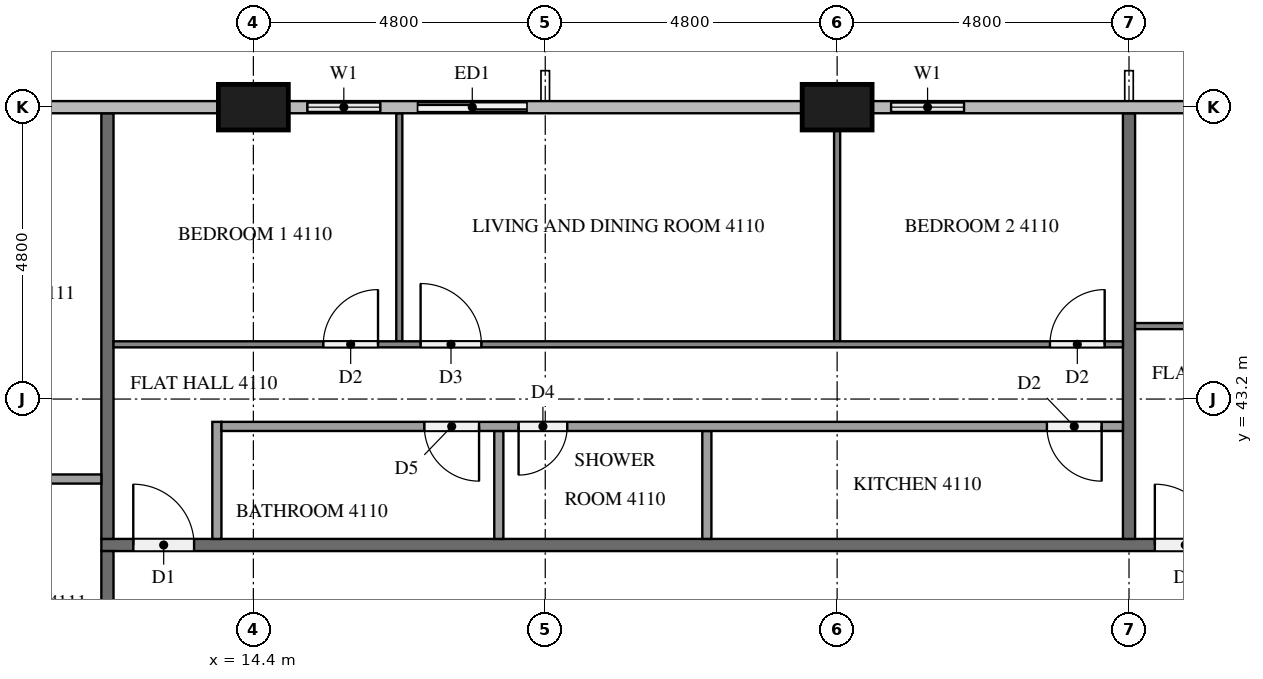
"""IFC4 building model, lengths in metres.
Left out: names, types, materials, properties, quantities, classifications, styles, units other than length and angle.
Written with IfcOpenShell. Run it as: python <this file> out.ifc"""

import sys

from ifc_helpers import new_model, si_unit, direction, frame, frame_2d, origin, origin_2d, place, context, subcontext, project, spatial, rectangle, extrude, element, fill, save


model = new_model("IFC4")
c1 = context("Model", 3, precision=1e-05, world=origin(), true_north=direction((0.0, 1.0)))
c2 = subcontext(c1, "Body", "Model", "MODEL_VIEW")
j1 = project(units=[si_unit("LENGTHUNIT", "METRE"), si_unit("PLANEANGLEUNIT", "RADIAN")], contexts=[c1])
p1 = place(None, origin())
s1 = spatial("IfcSite", under=j1, at=p1, CompositionType="ELEMENT")
p2 = place(p1, origin())
s2 = spatial("IfcBuilding", under=s1, at=p2, CompositionType="ELEMENT")
p3 = place(p2, frame((0.0, 0.0, 159.5)))
s3 = spatial("IfcBuildingStorey", under=s2, at=p3, CompositionType="ELEMENT", Elevation=159.5)
for number, where, z_axis, x_axis in (
    (1, (24.0, 48.0, 0.0), (0.0, 0.0, 1.0), (1.0, 0.0, 0.0)),
    (2, (14.4, 48.0, 0.0), (0.0, 0.0, 1.0), (1.0, 0.0, 0.0)),
):
    element("IfcColumn", number, at=place(p3, frame(where, z_axis=z_axis, x_axis=x_axis)), inside=s3, PredefinedType="COLUMN", context=c2, shape_type="SweptSolid", body=[
        extrude(rectangle(XDim=1.15, YDim=0.75, at=origin_2d()), origin(), (0.0, 0.0, 1.0), 3.2),
    ])
p4 = place(p3, frame((26.4, 48.0, 0.0), z_axis=(0.0, 0.0, 1.0), x_axis=(-1.0, 0.0, 0.0)))
e3 = element("IfcWall", 3, at=p4, inside=s3, PredefinedType="SOLIDWALL", context=c2, shape_type="SweptSolid", body=[
    extrude(rectangle(XDim=1.825, YDim=0.15, at=frame_2d((0.913, 0.0))), origin(), (0.0, 0.0, 1.0), 3.2),
])
p5 = place(p4, frame((0.312, 0.0, 0.9)))
e4 = element("IfcOpeningElement", 4, at=p5, cuts=e3, PredefinedType="OPENING", context=c2, shape_type="SweptSolid", body=[
    extrude(rectangle(XDim=1.2, YDim=1.4, at=frame_2d((0.6, 0.7))), frame((0.0, 0.085, 0.0), z_axis=(0.0, -1.0, 0.0), x_axis=(1.0, 0.0, 0.0)), (0.0, 0.0, 1.0), 0.17),
])
p6 = place(p3, frame((19.2, 48.0, 0.0), z_axis=(0.0, 0.0, 1.0), x_axis=(-1.0, 0.0, 0.0)))
e5 = element("IfcWall", 5, at=p6, inside=s3, PredefinedType="SOLIDWALL", context=c2, shape_type="SweptSolid", body=[
    extrude(rectangle(XDim=4.225, YDim=0.15, at=frame_2d((2.112, 0.0))), origin(), (0.0, 0.0, 1.0), 3.2),
])
p7 = place(p6, frame((0.3, 0.0, 0.0)))
e6 = element("IfcOpeningElement", 6, at=p7, cuts=e5, PredefinedType="OPENING", context=c2, shape_type="SweptSolid", body=[
    extrude(rectangle(XDim=1.8, YDim=2.4, at=frame_2d((0.9, 1.2))), frame((0.0, 0.085, 0.0), z_axis=(0.0, -1.0, 0.0), x_axis=(1.0, 0.0, 0.0)), (0.0, 0.0, 1.0), 0.17),
])
p8 = place(p6, frame((2.712, 0.0, 0.9)))
e7 = element("IfcOpeningElement", 7, at=p8, cuts=e5, PredefinedType="OPENING", context=c2, shape_type="SweptSolid", body=[
    extrude(rectangle(XDim=1.2, YDim=1.4, at=frame_2d((0.6, 0.7))), frame((0.0, 0.085, 0.0), z_axis=(0.0, -1.0, 0.0), x_axis=(1.0, 0.0, 0.0)), (0.0, 0.0, 1.0), 0.17),
])
p9 = place(p3, frame((11.9, 40.8, 0.0), z_axis=(0.0, 0.0, 1.0), x_axis=(1.0, 0.0, 0.0)))
e8 = element("IfcWall", 8, at=p9, inside=s3, PredefinedType="PARTITIONING", context=c2, shape_type="SweptSolid", body=[
    extrude(rectangle(XDim=38.6, YDim=0.2, at=frame_2d((19.3, 0.0))), origin(), (0.0, 0.0, 1.0), 3.2),
])
p10 = place(p9, frame((31.725, 0.0, 0.0)))
e9 = element("IfcOpeningElement", 9, at=p10, cuts=e8, PredefinedType="OPENING", context=c2, shape_type="SweptSolid", body=[
    extrude(rectangle(XDim=1.0, YDim=2.1, at=frame_2d((0.5, 1.05))), frame((0.0, 0.11, 0.0), z_axis=(0.0, -1.0, 0.0), x_axis=(1.0, 0.0, 0.0)), (0.0, 0.0, 1.0), 0.22),
])
p11 = place(p9, frame((17.325, 0.0, 0.0)))
e10 = element("IfcOpeningElement", 10, at=p11, cuts=e8, PredefinedType="OPENING", context=c2, shape_type="SweptSolid", body=[
    extrude(rectangle(XDim=1.0, YDim=2.1, at=frame_2d((0.5, 1.05))), frame((0.0, 0.11, 0.0), z_axis=(0.0, -1.0, 0.0), x_axis=(1.0, 0.0, 0.0)), (0.0, 0.0, 1.0), 0.22),
])
p12 = place(p9, frame((0.525, 0.0, 0.0)))
e11 = element("IfcOpeningElement", 11, at=p12, cuts=e8, PredefinedType="OPENING", context=c2, shape_type="SweptSolid", body=[
    extrude(rectangle(XDim=1.0, YDim=2.1, at=frame_2d((0.5, 1.05))), frame((0.0, 0.11, 0.0), z_axis=(0.0, -1.0, 0.0), x_axis=(1.0, 0.0, 0.0)), (0.0, 0.0, 1.0), 0.22),
])
p13 = place(p3, frame((12.0, 12.1, 0.0), z_axis=(0.0, 0.0, 1.0), x_axis=(0.0, 1.0, 0.0)))
e12 = element("IfcWall", 12, at=p13, inside=s3, PredefinedType="PARTITIONING", context=c2, shape_type="SweptSolid", body=[
    extrude(rectangle(XDim=28.6, YDim=0.2, at=frame_2d((14.3, 0.0))), origin(), (0.0, 0.0, 1.0), 3.2),
])
p14 = place(p13, frame((24.325, 0.0, 0.0)))
e13 = element("IfcOpeningElement", 13, at=p14, cuts=e12, PredefinedType="OPENING", context=c2, shape_type="SweptSolid", body=[
    extrude(rectangle(XDim=1.0, YDim=2.1, at=frame_2d((0.5, 1.05))), frame((0.0, 0.11, 0.0), z_axis=(0.0, -1.0, 0.0), x_axis=(1.0, 0.0, 0.0)), (0.0, 0.0, 1.0), 0.22),
])
p15 = place(p13, frame((22.475, 0.0, 0.0)))
e14 = element("IfcOpeningElement", 14, at=p15, cuts=e12, PredefinedType="OPENING", context=c2, shape_type="SweptSolid", body=[
    extrude(rectangle(XDim=1.0, YDim=2.1, at=frame_2d((0.5, 1.05))), frame((0.0, 0.11, 0.0), z_axis=(0.0, -1.0, 0.0), x_axis=(1.0, 0.0, 0.0)), (0.0, 0.0, 1.0), 0.22),
])
p16 = place(p13, frame((0.325, 0.0, 0.0)))
e15 = element("IfcOpeningElement", 15, at=p16, cuts=e12, PredefinedType="OPENING", context=c2, shape_type="SweptSolid", body=[
    extrude(rectangle(XDim=1.0, YDim=2.1, at=frame_2d((0.5, 1.05))), frame((0.0, 0.11, 0.0), z_axis=(0.0, -1.0, 0.0), x_axis=(1.0, 0.0, 0.0)), (0.0, 0.0, 1.0), 0.22),
])
for number, where, z_axis, x_axis in (
    (16, (28.8, 47.9, 0.0), (0.0, 0.0, 1.0), (0.0, -1.0, 0.0)),
    (17, (12.0, 47.9, 0.0), (0.0, 0.0, 1.0), (0.0, -1.0, 0.0)),
):
    element("IfcWall", number, at=place(p3, frame(where, z_axis=z_axis, x_axis=x_axis)), inside=s3, PredefinedType="PARTITIONING", context=c2, shape_type="SweptSolid", body=[
        extrude(rectangle(XDim=7.0, YDim=0.2, at=frame_2d((3.5, 0.0))), origin(), (0.0, 0.0, 1.0), 3.2),
    ])
p17 = place(p3, frame((28.9, 44.4, 0.0), z_axis=(0.0, 0.0, 1.0), x_axis=(1.0, 0.0, 0.0)))
e18 = element("IfcWall", 18, at=p17, inside=s3, PredefinedType="PARTITIONING", context=c2, shape_type="SweptSolid", body=[
    extrude(rectangle(XDim=14.2, YDim=0.1, at=frame_2d((7.1, 0.0))), origin(), (0.0, 0.0, 1.0), 3.2),
])
p18 = place(p17, frame((3.45, 0.0, 0.0)))
e19 = element("IfcOpeningElement", 19, at=p18, cuts=e18, PredefinedType="OPENING", context=c2, shape_type="SweptSolid", body=[
    extrude(rectangle(XDim=0.9, YDim=2.1, at=frame_2d((0.45, 1.05))), frame((0.0, 0.06, 0.0), z_axis=(0.0, -1.0, 0.0), x_axis=(1.0, 0.0, 0.0)), (0.0, 0.0, 1.0), 0.12),
])
p19 = place(p17, frame((5.05, 0.0, 0.0)))
e20 = element("IfcOpeningElement", 20, at=p19, cuts=e18, PredefinedType="OPENING", context=c2, shape_type="SweptSolid", body=[
    extrude(rectangle(XDim=0.9, YDim=2.1, at=frame_2d((0.45, 1.05))), frame((0.0, 0.06, 0.0), z_axis=(0.0, -1.0, 0.0), x_axis=(1.0, 0.0, 0.0)), (0.0, 0.0, 1.0), 0.12),
])
p20 = place(p17, frame((12.9, 0.0, 0.0)))
e21 = element("IfcOpeningElement", 21, at=p20, cuts=e18, PredefinedType="OPENING", context=c2, shape_type="SweptSolid", body=[
    extrude(rectangle(XDim=1.0, YDim=2.1, at=frame_2d((0.5, 1.05))), frame((0.0, 0.06, 0.0), z_axis=(0.0, -1.0, 0.0), x_axis=(1.0, 0.0, 0.0)), (0.0, 0.0, 1.0), 0.12),
])
p21 = place(p3, frame((16.8, 44.15, 0.0), z_axis=(0.0, 0.0, 1.0), x_axis=(0.0, 1.0, 0.0)))
e22 = element("IfcWall", 22, at=p21, inside=s3, PredefinedType="PARTITIONING", context=c2, shape_type="SweptSolid", body=[
    extrude(rectangle(XDim=3.75, YDim=0.1, at=frame_2d((1.875, 0.0))), origin(), (0.0, 0.0, 1.0), 3.2),
])
p22 = place(p3, frame((24.0, 44.15, 0.0), z_axis=(0.0, 0.0, 1.0), x_axis=(0.0, 1.0, 0.0)))
e23 = element("IfcWall", 23, at=p22, inside=s3, PredefinedType="PARTITIONING", context=c2, shape_type="SweptSolid", body=[
    extrude(rectangle(XDim=3.475, YDim=0.1, at=frame_2d((1.738, 0.0))), origin(), (0.0, 0.0, 1.0), 3.2),
])
p23 = place(p3, frame((12.1, 44.1, 0.0), z_axis=(0.0, 0.0, 1.0), x_axis=(1.0, 0.0, 0.0)))
e24 = element("IfcWall", 24, at=p23, inside=s3, PredefinedType="PARTITIONING", context=c2, shape_type="SweptSolid", body=[
    extrude(rectangle(XDim=16.6, YDim=0.1, at=frame_2d((8.3, 0.0))), origin(), (0.0, 0.0, 1.0), 3.2),
])
p24 = place(p23, frame((3.45, 0.0, 0.0)))
e25 = element("IfcOpeningElement", 25, at=p24, cuts=e24, PredefinedType="OPENING", context=c2, shape_type="SweptSolid", body=[
    extrude(rectangle(XDim=0.9, YDim=2.1, at=frame_2d((0.45, 1.05))), frame((0.0, 0.06, 0.0), z_axis=(0.0, -1.0, 0.0), x_axis=(1.0, 0.0, 0.0)), (0.0, 0.0, 1.0), 0.12),
])
p25 = place(p23, frame((5.05, 0.0, 0.0)))
e26 = element("IfcOpeningElement", 26, at=p25, cuts=e24, PredefinedType="OPENING", context=c2, shape_type="SweptSolid", body=[
    extrude(rectangle(XDim=1.0, YDim=2.1, at=frame_2d((0.5, 1.05))), frame((0.0, 0.06, 0.0), z_axis=(0.0, -1.0, 0.0), x_axis=(1.0, 0.0, 0.0)), (0.0, 0.0, 1.0), 0.12),
])
p26 = place(p23, frame((15.4, 0.0, 0.0)))
e27 = element("IfcOpeningElement", 27, at=p26, cuts=e24, PredefinedType="OPENING", context=c2, shape_type="SweptSolid", body=[
    extrude(rectangle(XDim=0.9, YDim=2.1, at=frame_2d((0.45, 1.05))), frame((0.0, 0.06, 0.0), z_axis=(0.0, -1.0, 0.0), x_axis=(1.0, 0.0, 0.0)), (0.0, 0.0, 1.0), 0.12),
])
for number, where, z_axis, x_axis in (
    (28, (18.437, 40.9, 0.0), (0.0, 0.0, 1.0), (0.0, 1.0, 0.0)),
    (29, (21.858, 40.9, 0.0), (0.0, 0.0, 1.0), (0.0, 1.0, 0.0)),
):
    element("IfcWall", number, at=place(p3, frame(where, z_axis=z_axis, x_axis=x_axis)), inside=s3, PredefinedType="PARTITIONING", context=c2, shape_type="SweptSolid", body=[
        extrude(rectangle(XDim=1.775, YDim=0.15, at=frame_2d((0.888, 0.0))), origin(), (0.0, 0.0, 1.0), 3.2),
    ])
p27 = place(p3, frame((13.8, 40.9, 0.0), z_axis=(0.0, 0.0, 1.0), x_axis=(0.0, 1.0, 0.0)))
e30 = element("IfcWall", 30, at=p27, inside=s3, PredefinedType="PARTITIONING", context=c2, shape_type="SweptSolid", body=[
    extrude(rectangle(XDim=1.925, YDim=0.15, at=frame_2d((0.962, 0.0))), origin(), (0.0, 0.0, 1.0), 3.2),
])
p28 = place(p3, frame((28.7, 42.75, 0.0), z_axis=(0.0, 0.0, 1.0), x_axis=(-1.0, 0.0, 0.0)))
e31 = element("IfcWall", 31, at=p28, inside=s3, PredefinedType="PARTITIONING", context=c2, shape_type="SweptSolid", body=[
    extrude(rectangle(XDim=14.825, YDim=0.15, at=frame_2d((7.413, 0.0))), origin(), (0.0, 0.0, 1.0), 3.2),
])
p29 = place(p28, frame((10.588, 0.0, 0.0)))
e32 = element("IfcOpeningElement", 32, at=p29, cuts=e31, PredefinedType="OPENING", context=c2, shape_type="SweptSolid", body=[
    extrude(rectangle(XDim=0.9, YDim=2.1, at=frame_2d((0.45, 1.05))), frame((0.0, 0.085, 0.0), z_axis=(0.0, -1.0, 0.0), x_axis=(1.0, 0.0, 0.0)), (0.0, 0.0, 1.0), 0.17),
])
p30 = place(p28, frame((9.138, 0.0, 0.0)))
e33 = element("IfcOpeningElement", 33, at=p30, cuts=e31, PredefinedType="OPENING", context=c2, shape_type="SweptSolid", body=[
    extrude(rectangle(XDim=0.8, YDim=2.1, at=frame_2d((0.4, 1.05))), frame((0.0, 0.085, 0.0), z_axis=(0.0, -1.0, 0.0), x_axis=(1.0, 0.0, 0.0)), (0.0, 0.0, 1.0), 0.17),
])
p31 = place(p28, frame((0.35, 0.0, 0.0)))
e34 = element("IfcOpeningElement", 34, at=p31, cuts=e31, PredefinedType="OPENING", context=c2, shape_type="SweptSolid", body=[
    extrude(rectangle(XDim=0.9, YDim=2.1, at=frame_2d((0.45, 1.05))), frame((0.0, 0.085, 0.0), z_axis=(0.0, -1.0, 0.0), x_axis=(1.0, 0.0, 0.0)), (0.0, 0.0, 1.0), 0.17),
])
p32 = place(p3, frame((11.9, 41.885, 0.0), z_axis=(0.0, 0.0, 1.0), x_axis=(-1.0, 0.0, 0.0)))
e35 = element("IfcWall", 35, at=p32, inside=s3, PredefinedType="PARTITIONING", context=c2, shape_type="SweptSolid", body=[
    extrude(rectangle(XDim=2.975, YDim=0.15, at=frame_2d((1.487, 0.0))), origin(), (0.0, 0.0, 1.0), 3.2),
])
p33 = place(p5, origin())
e36 = element("IfcWindow", 36, at=p33, inside=s3, PartitioningType="SINGLE_PANEL", PredefinedType="WINDOW", context=c2, shape_type="SweptSolid", body=[
    extrude(rectangle(XDim=1.2, YDim=1.4, at=frame_2d((0.6, 0.7))), frame((0.0, 0.03, 0.0), z_axis=(0.0, -1.0, 0.0), x_axis=(1.0, 0.0, 0.0)), (0.0, 0.0, 1.0), 0.06),
])
fill(e4, e36)
p34 = place(p7, origin())
e37 = element("IfcDoor", 37, at=p34, inside=s3, OperationType="SLIDING_TO_RIGHT", PredefinedType="DOOR", context=c2, shape_type="SweptSolid", body=[
    extrude(rectangle(XDim=1.8, YDim=2.4, at=frame_2d((0.9, 1.2))), frame((0.0, 0.025, 0.0), z_axis=(0.0, -1.0, 0.0), x_axis=(1.0, 0.0, 0.0)), (0.0, 0.0, 1.0), 0.05),
])
fill(e6, e37)
p35 = place(p8, origin())
e38 = element("IfcWindow", 38, at=p35, inside=s3, PartitioningType="SINGLE_PANEL", PredefinedType="WINDOW", context=c2, shape_type="SweptSolid", body=[
    extrude(rectangle(XDim=1.2, YDim=1.4, at=frame_2d((0.6, 0.7))), frame((0.0, 0.03, 0.0), z_axis=(0.0, -1.0, 0.0), x_axis=(1.0, 0.0, 0.0)), (0.0, 0.0, 1.0), 0.06),
])
fill(e7, e38)
p36 = place(p11, origin())
e39 = element("IfcDoor", 39, at=p36, inside=s3, OperationType="SINGLE_SWING_LEFT", PredefinedType="DOOR", context=c2, shape_type="SweptSolid", body=[
    extrude(rectangle(XDim=1.0, YDim=2.1, at=frame_2d((0.5, 1.05))), frame((0.0, 0.025, 0.0), z_axis=(0.0, -1.0, 0.0), x_axis=(1.0, 0.0, 0.0)), (0.0, 0.0, 1.0), 0.05),
])
fill(e10, e39)
p37 = place(p12, origin())
e40 = element("IfcDoor", 40, at=p37, inside=s3, OperationType="SINGLE_SWING_LEFT", PredefinedType="DOOR", context=c2, shape_type="SweptSolid", body=[
    extrude(rectangle(XDim=1.0, YDim=2.1, at=frame_2d((0.5, 1.05))), frame((0.0, 0.025, 0.0), z_axis=(0.0, -1.0, 0.0), x_axis=(1.0, 0.0, 0.0)), (0.0, 0.0, 1.0), 0.05),
])
fill(e11, e40)
p38 = place(p24, origin())
e41 = element("IfcDoor", 41, at=p38, inside=s3, OperationType="SINGLE_SWING_RIGHT", PredefinedType="DOOR", context=c2, shape_type="SweptSolid", body=[
    extrude(rectangle(XDim=0.9, YDim=2.1, at=frame_2d((0.45, 1.05))), frame((0.0, 0.025, 0.0), z_axis=(0.0, -1.0, 0.0), x_axis=(1.0, 0.0, 0.0)), (0.0, 0.0, 1.0), 0.05),
])
fill(e25, e41)
p39 = place(p25, origin())
e42 = element("IfcDoor", 42, at=p39, inside=s3, OperationType="SINGLE_SWING_LEFT", PredefinedType="DOOR", context=c2, shape_type="SweptSolid", body=[
    extrude(rectangle(XDim=1.0, YDim=2.1, at=frame_2d((0.5, 1.05))), frame((0.0, 0.025, 0.0), z_axis=(0.0, -1.0, 0.0), x_axis=(1.0, 0.0, 0.0)), (0.0, 0.0, 1.0), 0.05),
])
fill(e26, e42)
p40 = place(p26, origin())
e43 = element("IfcDoor", 43, at=p40, inside=s3, OperationType="SINGLE_SWING_RIGHT", PredefinedType="DOOR", context=c2, shape_type="SweptSolid", body=[
    extrude(rectangle(XDim=0.9, YDim=2.1, at=frame_2d((0.45, 1.05))), frame((0.0, 0.025, 0.0), z_axis=(0.0, -1.0, 0.0), x_axis=(1.0, 0.0, 0.0)), (0.0, 0.0, 1.0), 0.05),
])
fill(e27, e43)
p41 = place(p29, origin())
e44 = element("IfcDoor", 44, at=p41, inside=s3, OperationType="SINGLE_SWING_LEFT", PredefinedType="DOOR", context=c2, shape_type="SweptSolid", body=[
    extrude(rectangle(XDim=0.9, YDim=2.1, at=frame_2d((0.45, 1.05))), frame((0.0, 0.025, 0.0), z_axis=(0.0, -1.0, 0.0), x_axis=(1.0, 0.0, 0.0)), (0.0, 0.0, 1.0), 0.05),
])
fill(e32, e44)
p42 = place(p30, origin())
e45 = element("IfcDoor", 45, at=p42, inside=s3, OperationType="SINGLE_SWING_RIGHT", PredefinedType="DOOR", context=c2, shape_type="SweptSolid", body=[
    extrude(rectangle(XDim=0.8, YDim=2.1, at=frame_2d((0.4, 1.05))), frame((0.0, 0.025, 0.0), z_axis=(0.0, -1.0, 0.0), x_axis=(1.0, 0.0, 0.0)), (0.0, 0.0, 1.0), 0.05),
])
fill(e33, e45)
p43 = place(p31, origin())
e46 = element("IfcDoor", 46, at=p43, inside=s3, OperationType="SINGLE_SWING_LEFT", PredefinedType="DOOR", context=c2, shape_type="SweptSolid", body=[
    extrude(rectangle(XDim=0.9, YDim=2.1, at=frame_2d((0.45, 1.05))), frame((0.0, 0.025, 0.0), z_axis=(0.0, -1.0, 0.0), x_axis=(1.0, 0.0, 0.0)), (0.0, 0.0, 1.0), 0.05),
])
fill(e34, e46)
save(model, sys.argv[1])
